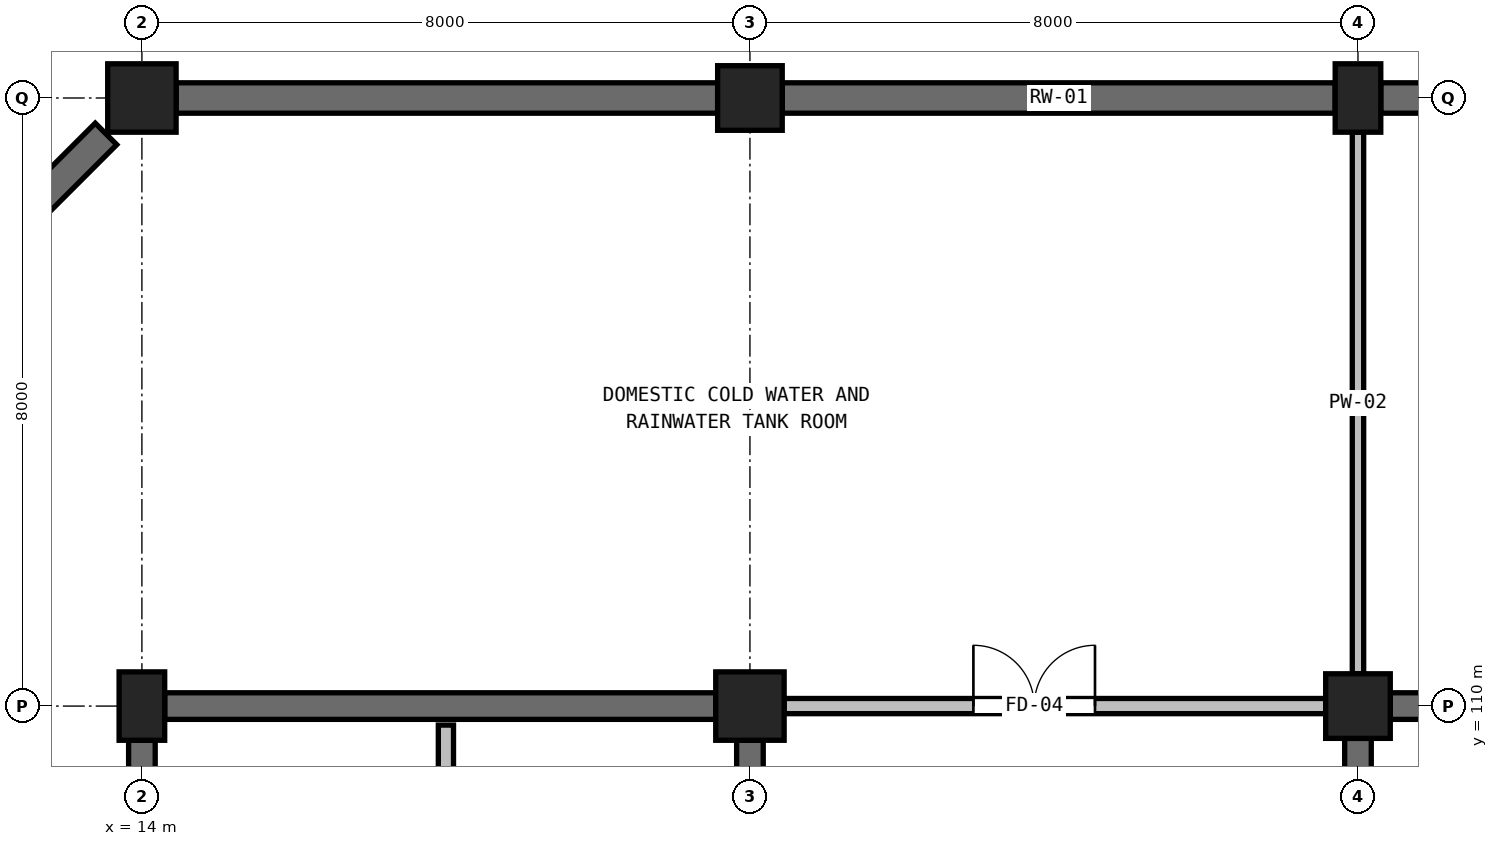
"""IFC4 building model, lengths in metres.
Left out: names, types, materials, properties, quantities, classifications, styles, units other than length and angle.
Written with IfcOpenShell. Run it as: python <this file> out.ifc"""

import sys

from ifc_helpers import new_model, si_unit, direction, frame, frame_2d, origin, origin_2d, place, context, subcontext, project, spatial, rectangle, extrude, element, fill, save


model = new_model("IFC4")
c1 = context("Model", 3, precision=1e-05, world=origin(), true_north=direction((0.0, 1.0)))
c2 = subcontext(c1, "Body", "Model", "MODEL_VIEW")
j1 = project(units=[si_unit("LENGTHUNIT", "METRE"), si_unit("PLANEANGLEUNIT", "RADIAN")], contexts=[c1])
p1 = place(None, origin())
s1 = spatial("IfcSite", under=j1, at=p1, CompositionType="ELEMENT")
p2 = place(p1, origin())
s2 = spatial("IfcBuilding", under=s1, at=p2, CompositionType="ELEMENT")
p3 = place(p2, frame((0.0, 0.0, -4.2)))
s3 = spatial("IfcBuildingStorey", under=s2, at=p3, CompositionType="ELEMENT", Elevation=-4.2)
p4 = place(p3, frame((14.0, 110.0, 0.0), z_axis=(0.0, 0.0, 1.0), x_axis=(1.0, 0.0, 0.0)))
e1 = element("IfcColumn", 1, at=p4, inside=s3, PredefinedType="COLUMN", context=c2, shape_type="SweptSolid", body=[
    extrude(rectangle(XDim=0.6, YDim=0.9, at=origin_2d()), origin(), (0.0, 0.0, 1.0), 4.2),
])
for number, where, z_axis, x_axis in (
    (2, (14.0, 118.0, 0.0), (0.0, 0.0, 1.0), (1.0, 0.0, 0.0)),
    (3, (22.0, 110.0, 0.0), (0.0, 0.0, 1.0), (1.0, 0.0, 0.0)),
):
    element("IfcColumn", number, at=place(p3, frame(where, z_axis=z_axis, x_axis=x_axis)), inside=s3, PredefinedType="COLUMN", context=c2, shape_type="SweptSolid", body=[
        extrude(rectangle(XDim=0.9, YDim=0.9, at=origin_2d()), origin(), (0.0, 0.0, 1.0), 4.2),
    ])
for number, where, z_axis, x_axis in (
    (4, (22.0, 118.0, 0.0), (0.0, 0.0, 1.0), (1.0, 0.0, 0.0)),
    (5, (30.0, 110.0, 0.0), (0.0, 0.0, 1.0), (1.0, 0.0, 0.0)),
):
    element("IfcColumn", number, at=place(p3, frame(where, z_axis=z_axis, x_axis=x_axis)), inside=s3, PredefinedType="COLUMN", context=c2, shape_type="SweptSolid", body=[
        extrude(rectangle(XDim=0.85, YDim=0.85, at=origin_2d()), origin(), (0.0, 0.0, 1.0), 4.2),
    ])
p5 = place(p3, frame((30.0, 118.0, 0.0), z_axis=(0.0, 0.0, 1.0), x_axis=(1.0, 0.0, 0.0)))
e6 = element("IfcColumn", 6, at=p5, inside=s3, PredefinedType="COLUMN", context=c2, shape_type="SweptSolid", body=[
    extrude(rectangle(XDim=0.6, YDim=0.9, at=origin_2d()), origin(), (0.0, 0.0, 1.0), 4.2),
])
p6 = place(p3, frame((14.45, 118.0, 0.0), z_axis=(0.0, 0.0, 1.0), x_axis=(1.0, 0.0, 0.0)))
e7 = element("IfcWall", 7, at=p6, inside=s3, PredefinedType="USERDEFINED", context=c2, shape_type="SweptSolid", body=[
    extrude(rectangle(XDim=7.125, YDim=0.4, at=frame_2d((3.562, 0.0))), origin(), (0.0, 0.0, 1.0), 3.92),
])
p7 = place(p3, frame((22.425, 118.0, 0.0), z_axis=(0.0, 0.0, 1.0), x_axis=(1.0, 0.0, 0.0)))
e8 = element("IfcWall", 8, at=p7, inside=s3, PredefinedType="USERDEFINED", context=c2, shape_type="SweptSolid", body=[
    extrude(rectangle(XDim=7.275, YDim=0.4, at=frame_2d((3.637, 0.0))), origin(), (0.0, 0.0, 1.0), 3.92),
])
p8 = place(p3, frame((30.3, 118.0, 0.0), z_axis=(0.0, 0.0, 1.0), x_axis=(1.0, 0.0, 0.0)))
e9 = element("IfcWall", 9, at=p8, inside=s3, PredefinedType="USERDEFINED", context=c2, shape_type="SweptSolid", body=[
    extrude(rectangle(XDim=7.25, YDim=0.4, at=frame_2d((3.625, 0.0))), origin(), (0.0, 0.0, 1.0), 3.92),
])
p9 = place(p3, frame((6.394, 110.394, 0.0), z_axis=(0.0, 0.0, 1.0), x_axis=(0.707106781187, 0.707106781187, 0.0)))
e10 = element("IfcWall", 10, at=p9, inside=s3, PredefinedType="USERDEFINED", context=c2, shape_type="SweptSolid", body=[
    extrude(rectangle(XDim=10.089, YDim=0.4, at=frame_2d((5.044, 0.0))), origin(), (0.0, 0.0, 1.0), 3.92),
])
p10 = place(p3, frame((14.3, 110.0, 0.0), z_axis=(0.0, 0.0, 1.0), x_axis=(1.0, 0.0, 0.0)))
e11 = element("IfcWall", 11, at=p10, inside=s3, PredefinedType="SHEAR", context=c2, shape_type="SweptSolid", body=[
    extrude(rectangle(XDim=7.25, YDim=0.35, at=frame_2d((3.625, 0.0))), origin(), (0.0, 0.0, 1.0), 3.98),
])
p11 = place(p3, frame((14.0, 102.425, 0.0), z_axis=(0.0, 0.0, 1.0), x_axis=(0.0, 1.0, 0.0)))
e12 = element("IfcWall", 12, at=p11, inside=s3, PredefinedType="SHEAR", context=c2, shape_type="SweptSolid", body=[
    extrude(rectangle(XDim=7.125, YDim=0.35, at=frame_2d((3.562, 0.0))), origin(), (0.0, 0.0, 1.0), 3.98),
])
p12 = place(p3, frame((22.0, 102.45, 0.0), z_axis=(0.0, 0.0, 1.0), x_axis=(0.0, 1.0, 0.0)))
e13 = element("IfcWall", 13, at=p12, inside=s3, PredefinedType="SHEAR", context=c2, shape_type="SweptSolid", body=[
    extrude(rectangle(XDim=7.1, YDim=0.35, at=frame_2d((3.55, 0.0))), origin(), (0.0, 0.0, 1.0), 3.98),
])
p13 = place(p12, frame((0.35, 0.0, 0.0)))
e14 = element("IfcOpeningElement", 14, at=p13, cuts=e13, PredefinedType="OPENING", context=c2, shape_type="SweptSolid", body=[
    extrude(rectangle(XDim=1.8, YDim=2.2, at=frame_2d((0.9, 1.1))), frame((0.0, 0.185, 0.0), z_axis=(0.0, -1.0, 0.0), x_axis=(1.0, 0.0, 0.0)), (0.0, 0.0, 1.0), 0.37),
])
p14 = place(p3, frame((18.0, 105.35, 0.0), z_axis=(0.0, 0.0, 1.0), x_axis=(0.0, 1.0, 0.0)))
e15 = element("IfcWall", 15, at=p14, inside=s3, PredefinedType="PARTITIONING", context=c2, shape_type="SweptSolid", body=[
    extrude(rectangle(XDim=4.4, YDim=0.2, at=frame_2d((2.2, 0.0))), origin(), (0.0, 0.0, 1.0), 3.9),
])
p15 = place(p3, frame((30.425, 110.0, 0.0), z_axis=(0.0, 0.0, 1.0), x_axis=(1.0, 0.0, 0.0)))
e16 = element("IfcWall", 16, at=p15, inside=s3, PredefinedType="SHEAR", context=c2, shape_type="SweptSolid", body=[
    extrude(rectangle(XDim=7.275, YDim=0.35, at=frame_2d((3.637, 0.0))), origin(), (0.0, 0.0, 1.0), 3.98),
])
p16 = place(p3, frame((30.0, 102.45, 0.0), z_axis=(0.0, 0.0, 1.0), x_axis=(0.0, 1.0, 0.0)))
e17 = element("IfcWall", 17, at=p16, inside=s3, PredefinedType="SHEAR", context=c2, shape_type="SweptSolid", body=[
    extrude(rectangle(XDim=7.125, YDim=0.35, at=frame_2d((3.562, 0.0))), origin(), (0.0, 0.0, 1.0), 3.98),
])
p17 = place(p16, frame((0.35, 0.0, 0.0)))
e18 = element("IfcOpeningElement", 18, at=p17, cuts=e17, PredefinedType="OPENING", context=c2, shape_type="SweptSolid", body=[
    extrude(rectangle(XDim=1.8, YDim=2.2, at=frame_2d((0.9, 1.1))), frame((0.0, 0.185, 0.0), z_axis=(0.0, -1.0, 0.0), x_axis=(1.0, 0.0, 0.0)), (0.0, 0.0, 1.0), 0.37),
])
p18 = place(p3, frame((22.45, 110.0, 0.0), z_axis=(0.0, 0.0, 1.0), x_axis=(1.0, 0.0, 0.0)))
e19 = element("IfcWall", 19, at=p18, inside=s3, PredefinedType="PARTITIONING", context=c2, shape_type="SweptSolid", body=[
    extrude(rectangle(XDim=7.125, YDim=0.2, at=frame_2d((3.562, 0.0))), origin(), (0.0, 0.0, 1.0), 3.37),
])
p19 = place(p18, frame((2.49, 0.0, 0.0)))
e20 = element("IfcOpeningElement", 20, at=p19, cuts=e19, PredefinedType="OPENING", context=c2, shape_type="SweptSolid", body=[
    extrude(rectangle(XDim=1.6, YDim=2.2, at=frame_2d((0.8, 1.1))), frame((0.0, 0.11, 0.0), z_axis=(0.0, -1.0, 0.0), x_axis=(1.0, 0.0, 0.0)), (0.0, 0.0, 1.0), 0.22),
])
p20 = place(p3, frame((30.0, 110.425, 0.0), z_axis=(0.0, 0.0, 1.0), x_axis=(0.0, 1.0, 0.0)))
e21 = element("IfcWall", 21, at=p20, inside=s3, PredefinedType="PARTITIONING", context=c2, shape_type="SweptSolid", body=[
    extrude(rectangle(XDim=7.125, YDim=0.15, at=frame_2d((3.562, 0.0))), origin(), (0.0, 0.0, 1.0), 2.92),
])
p21 = place(p19, origin())
e22 = element("IfcDoor", 22, at=p21, inside=s3, OperationType="DOUBLE_DOOR_SINGLE_SWING", PredefinedType="DOOR", context=c2, shape_type="SweptSolid", body=[
    extrude(rectangle(XDim=1.6, YDim=2.2, at=frame_2d((0.8, 1.1))), frame((0.0, 0.025, 0.0), z_axis=(0.0, -1.0, 0.0), x_axis=(1.0, 0.0, 0.0)), (0.0, 0.0, 1.0), 0.05),
])
fill(e20, e22)
save(model, sys.argv[1])
